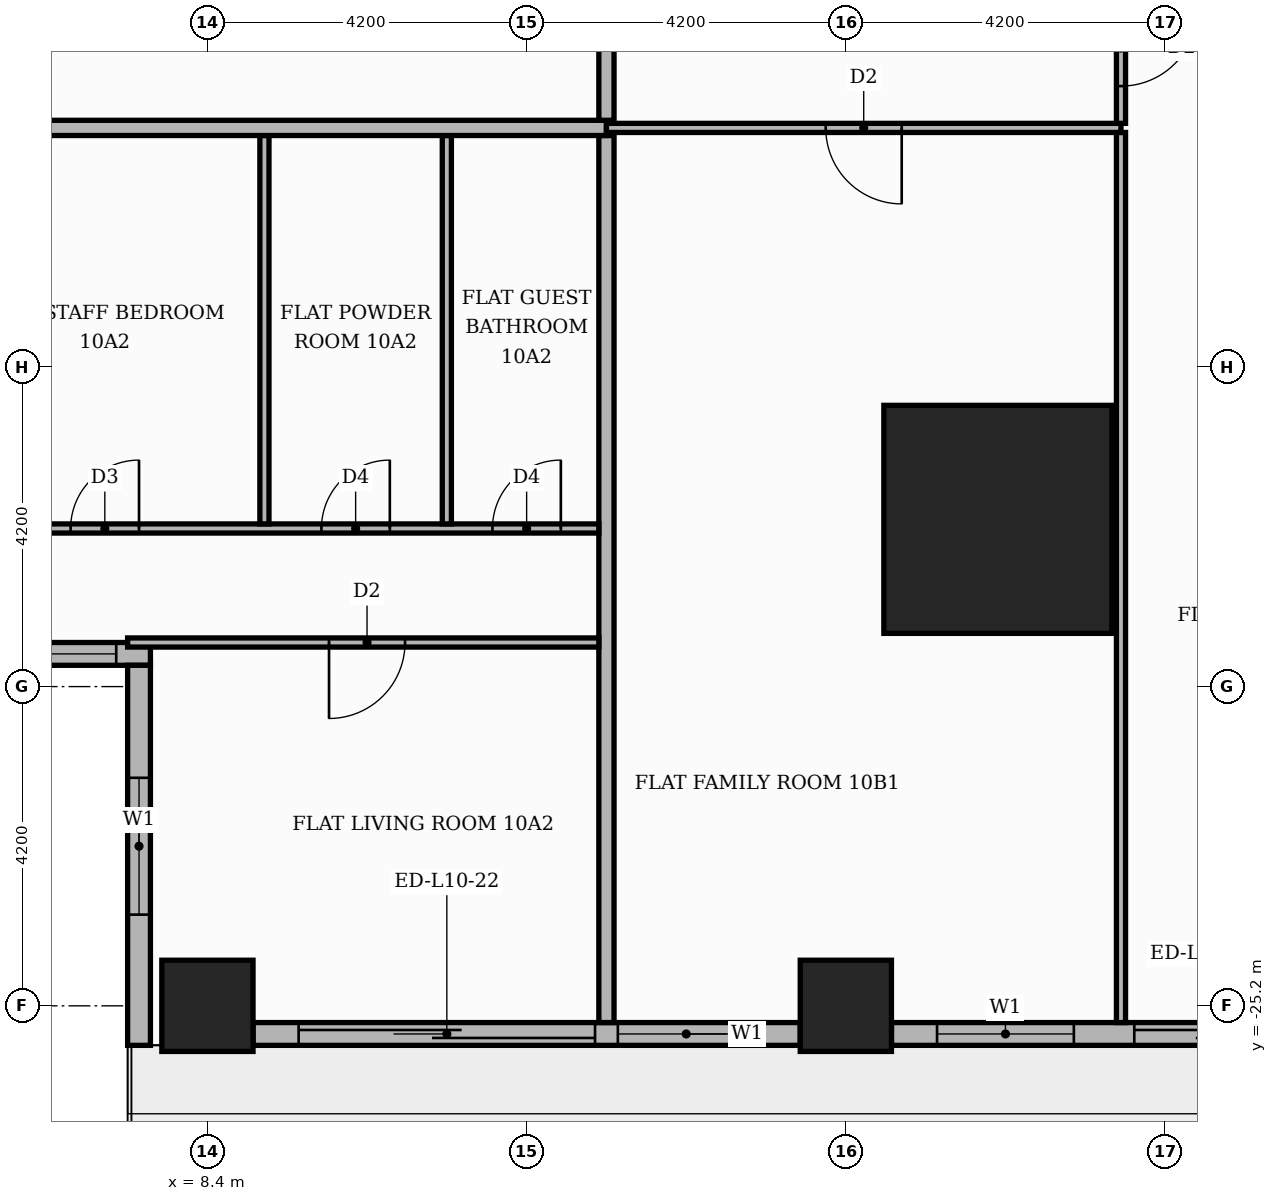
"""IFC4 building model, lengths in metres.
Left out: names, types, materials, properties, quantities, classifications, styles, units other than length and angle.
Written with IfcOpenShell. Run it as: python <this file> out.ifc"""

import sys

from ifc_helpers import new_model, si_unit, direction, frame, frame_2d, origin, origin_2d, place, context, subcontext, project, spatial, rectangle, extrude, element, fill, save


model = new_model("IFC4")
c1 = context("Model", 3, precision=1e-05, world=origin(), true_north=direction((0.0, 1.0)))
c2 = subcontext(c1, "Body", "Model", "MODEL_VIEW")
j1 = project(units=[si_unit("LENGTHUNIT", "METRE"), si_unit("PLANEANGLEUNIT", "RADIAN")], contexts=[c1])
p1 = place(None, origin())
s1 = spatial("IfcSite", under=j1, at=p1, CompositionType="ELEMENT")
p2 = place(p1, origin())
s2 = spatial("IfcBuilding", under=s1, at=p2, CompositionType="ELEMENT")
p3 = place(p2, frame((0.0, 0.0, 46.5)))
s3 = spatial("IfcBuildingStorey", under=s2, at=p3, CompositionType="ELEMENT", Elevation=46.5)
p4 = place(p3, frame((18.8, -18.8, 0.0), z_axis=(0.0, 0.0, 1.0), x_axis=(1.0, 0.0, 0.0)))
e1 = element("IfcColumn", 1, at=p4, inside=s3, PredefinedType="COLUMN", context=c2, shape_type="SweptSolid", body=[
    extrude(rectangle(XDim=3.0, YDim=3.0, at=origin_2d()), origin(), (0.0, 0.0, 1.0), 3.9),
])
for number, where, z_axis, x_axis in (
    (2, (8.4, -25.2, 0.0), (0.0, 0.0, 1.0), (1.0, 0.0, 0.0)),
    (3, (16.8, -25.2, 0.0), (0.0, 0.0, 1.0), (1.0, 0.0, 0.0)),
):
    element("IfcColumn", number, at=place(p3, frame(where, z_axis=z_axis, x_axis=x_axis)), inside=s3, PredefinedType="COLUMN", context=c2, shape_type="SweptSolid", body=[
        extrude(rectangle(XDim=1.2, YDim=1.2, at=origin_2d()), origin(), (0.0, 0.0, 1.0), 3.9),
    ])
p5 = place(p3, frame((-7.35, -20.57, 0.0), z_axis=(0.0, 0.0, 1.0), x_axis=(1.0, 0.0, 0.0)))
e4 = element("IfcWall", 4, at=p5, inside=s3, PredefinedType="STANDARD", context=c2, shape_type="SweptSolid", body=[
    extrude(rectangle(XDim=15.0, YDim=0.3, at=frame_2d((7.5, 0.0))), origin(), (0.0, 0.0, 1.0), 3.48),
])
p6 = place(p5, frame((0.15, 0.0, 0.9)))
e5 = element("IfcOpeningElement", 5, at=p6, cuts=e4, PredefinedType="OPENING", context=c2, shape_type="SweptSolid", body=[
    extrude(rectangle(XDim=1.8, YDim=2.1, at=frame_2d((0.9, 1.05))), frame((0.0, 0.16, 0.0), z_axis=(0.0, -1.0, 0.0), x_axis=(1.0, 0.0, 0.0)), (0.0, 0.0, 1.0), 0.32),
])
p7 = place(p5, frame((2.25, 0.0, 0.9)))
e6 = element("IfcOpeningElement", 6, at=p7, cuts=e4, PredefinedType="OPENING", context=c2, shape_type="SweptSolid", body=[
    extrude(rectangle(XDim=6.0, YDim=2.1, at=frame_2d((3.0, 1.05))), frame((0.0, 0.16, 0.0), z_axis=(0.0, -1.0, 0.0), x_axis=(1.0, 0.0, 0.0)), (0.0, 0.0, 1.0), 0.32),
])
p8 = place(p5, frame((8.55, 0.0, 0.9)))
e7 = element("IfcOpeningElement", 7, at=p8, cuts=e4, PredefinedType="OPENING", context=c2, shape_type="SweptSolid", body=[
    extrude(rectangle(XDim=6.0, YDim=2.1, at=frame_2d((3.0, 1.05))), frame((0.0, 0.16, 0.0), z_axis=(0.0, -1.0, 0.0), x_axis=(1.0, 0.0, 0.0)), (0.0, 0.0, 1.0), 0.32),
])
p9 = place(p3, frame((7.5, -20.72, 0.0), z_axis=(0.0, 0.0, 1.0), x_axis=(0.0, -1.0, 0.0)))
e8 = element("IfcWall", 8, at=p9, inside=s3, PredefinedType="STANDARD", context=c2, shape_type="SweptSolid", body=[
    extrude(rectangle(XDim=5.0, YDim=0.3, at=frame_2d((2.5, 0.0))), origin(), (0.0, 0.0, 1.0), 3.48),
])
p10 = place(p9, frame((1.48, 0.0, 0.9)))
e9 = element("IfcOpeningElement", 9, at=p10, cuts=e8, PredefinedType="OPENING", context=c2, shape_type="SweptSolid", body=[
    extrude(rectangle(XDim=1.8, YDim=2.1, at=frame_2d((0.9, 1.05))), frame((0.0, 0.16, 0.0), z_axis=(0.0, -1.0, 0.0), x_axis=(1.0, 0.0, 0.0)), (0.0, 0.0, 1.0), 0.32),
])
p11 = place(p3, frame((9.0, -25.57, 0.0), z_axis=(0.0, 0.0, 1.0), x_axis=(1.0, 0.0, 0.0)))
e10 = element("IfcWall", 10, at=p11, inside=s3, PredefinedType="STANDARD", context=c2, shape_type="SweptSolid", body=[
    extrude(rectangle(XDim=7.2, YDim=0.3, at=frame_2d((3.6, 0.0))), origin(), (0.0, 0.0, 1.0), 3.48),
])
p12 = place(p11, frame((0.6, 0.0, 0.0)))
e11 = element("IfcOpeningElement", 11, at=p12, cuts=e10, PredefinedType="OPENING", context=c2, shape_type="SweptSolid", body=[
    extrude(rectangle(XDim=3.9, YDim=2.4, at=frame_2d((1.95, 1.2))), frame((0.0, 0.16, 0.0), z_axis=(0.0, -1.0, 0.0), x_axis=(1.0, 0.0, 0.0)), (0.0, 0.0, 1.0), 0.32),
])
p13 = place(p11, frame((4.8, 0.0, 0.9)))
e12 = element("IfcOpeningElement", 12, at=p13, cuts=e10, PredefinedType="OPENING", context=c2, shape_type="SweptSolid", body=[
    extrude(rectangle(XDim=1.8, YDim=2.1, at=frame_2d((0.9, 1.05))), frame((0.0, 0.16, 0.0), z_axis=(0.0, -1.0, 0.0), x_axis=(1.0, 0.0, 0.0)), (0.0, 0.0, 1.0), 0.32),
])
p14 = place(p3, frame((17.4, -25.57, 0.0), z_axis=(0.0, 0.0, 1.0), x_axis=(1.0, 0.0, 0.0)))
e13 = element("IfcWall", 13, at=p14, inside=s3, PredefinedType="STANDARD", context=c2, shape_type="SweptSolid", body=[
    extrude(rectangle(XDim=5.32, YDim=0.3, at=frame_2d((2.66, 0.0))), origin(), (0.0, 0.0, 1.0), 3.48),
])
p15 = place(p14, frame((0.6, 0.0, 0.9)))
e14 = element("IfcOpeningElement", 14, at=p15, cuts=e13, PredefinedType="OPENING", context=c2, shape_type="SweptSolid", body=[
    extrude(rectangle(XDim=1.8, YDim=2.1, at=frame_2d((0.9, 1.05))), frame((0.0, 0.16, 0.0), z_axis=(0.0, -1.0, 0.0), x_axis=(1.0, 0.0, 0.0)), (0.0, 0.0, 1.0), 0.32),
])
p16 = place(p14, frame((3.195, 0.0, 0.0)))
e15 = element("IfcOpeningElement", 15, at=p16, cuts=e13, PredefinedType="OPENING", context=c2, shape_type="SweptSolid", body=[
    extrude(rectangle(XDim=1.8, YDim=2.4, at=frame_2d((0.9, 1.2))), frame((0.0, 0.16, 0.0), z_axis=(0.0, -1.0, 0.0), x_axis=(1.0, 0.0, 0.0)), (0.0, 0.0, 1.0), 0.32),
])
p17 = place(p3, frame((13.65, -25.42, 0.0), z_axis=(0.0, 0.0, 1.0), x_axis=(0.0, 1.0, 0.0)))
e16 = element("IfcWall", 16, at=p17, inside=s3, PredefinedType="PARTITIONING", context=c2, shape_type="SweptSolid", body=[
    extrude(rectangle(XDim=11.67, YDim=0.2, at=frame_2d((5.835, 0.0))), origin(), (0.0, 0.0, 1.0), 3.48),
])
p18 = place(p3, frame((20.42, -25.42, 0.0), z_axis=(0.0, 0.0, 1.0), x_axis=(0.0, 1.0, 0.0)))
e17 = element("IfcWall", 17, at=p18, inside=s3, PredefinedType="PARTITIONING", context=c2, shape_type="SweptSolid", body=[
    extrude(rectangle(XDim=11.71, YDim=0.12, at=frame_2d((5.855, 0.0))), origin(), (0.0, 0.0, 1.0), 3.48),
])
p19 = place(p3, frame((7.35, -20.42, 0.0), z_axis=(0.0, 0.0, 1.0), x_axis=(1.0, 0.0, 0.0)))
e18 = element("IfcWall", 18, at=p19, inside=s3, PredefinedType="PARTITIONING", context=c2, shape_type="SweptSolid", body=[
    extrude(rectangle(XDim=6.2, YDim=0.12, at=frame_2d((3.1, 0.0))), origin(), (0.0, 0.0, 1.0), 3.48),
])
p20 = place(p19, frame((2.65, 0.0, 0.0)))
e19 = element("IfcOpeningElement", 19, at=p20, cuts=e18, PredefinedType="OPENING", context=c2, shape_type="SweptSolid", body=[
    extrude(rectangle(XDim=1.0, YDim=2.1, at=frame_2d((0.5, 1.05))), frame((0.0, 0.07, 0.0), z_axis=(0.0, -1.0, 0.0), x_axis=(1.0, 0.0, 0.0)), (0.0, 0.0, 1.0), 0.14),
])
p21 = place(p3, frame((-1.05, -18.92, 0.0), z_axis=(0.0, 0.0, 1.0), x_axis=(1.0, 0.0, 0.0)))
e20 = element("IfcWall", 20, at=p21, inside=s3, PredefinedType="PARTITIONING", context=c2, shape_type="SweptSolid", body=[
    extrude(rectangle(XDim=14.6, YDim=0.12, at=frame_2d((7.3, 0.0))), origin(), (0.0, 0.0, 1.0), 3.48),
])
p22 = place(p21, frame((2.55, 0.0, 0.0)))
e21 = element("IfcOpeningElement", 21, at=p22, cuts=e20, PredefinedType="OPENING", context=c2, shape_type="SweptSolid", body=[
    extrude(rectangle(XDim=0.9, YDim=2.1, at=frame_2d((0.45, 1.05))), frame((0.0, 0.07, 0.0), z_axis=(0.0, -1.0, 0.0), x_axis=(1.0, 0.0, 0.0)), (0.0, 0.0, 1.0), 0.14),
])
p23 = place(p21, frame((7.65, 0.0, 0.0)))
e22 = element("IfcOpeningElement", 22, at=p23, cuts=e20, PredefinedType="OPENING", context=c2, shape_type="SweptSolid", body=[
    extrude(rectangle(XDim=0.9, YDim=2.1, at=frame_2d((0.45, 1.05))), frame((0.0, 0.07, 0.0), z_axis=(0.0, -1.0, 0.0), x_axis=(1.0, 0.0, 0.0)), (0.0, 0.0, 1.0), 0.14),
])
p24 = place(p21, frame((10.95, 0.0, 0.0)))
e23 = element("IfcOpeningElement", 23, at=p24, cuts=e20, PredefinedType="OPENING", context=c2, shape_type="SweptSolid", body=[
    extrude(rectangle(XDim=0.9, YDim=2.1, at=frame_2d((0.45, 1.05))), frame((0.0, 0.07, 0.0), z_axis=(0.0, -1.0, 0.0), x_axis=(1.0, 0.0, 0.0)), (0.0, 0.0, 1.0), 0.14),
])
p25 = place(p21, frame((13.2, 0.0, 0.0)))
e24 = element("IfcOpeningElement", 24, at=p25, cuts=e20, PredefinedType="OPENING", context=c2, shape_type="SweptSolid", body=[
    extrude(rectangle(XDim=0.9, YDim=2.1, at=frame_2d((0.45, 1.05))), frame((0.0, 0.07, 0.0), z_axis=(0.0, -1.0, 0.0), x_axis=(1.0, 0.0, 0.0)), (0.0, 0.0, 1.0), 0.14),
])
for number, where, z_axis, x_axis in (
    (25, (9.15, -18.86, 0.0), (0.0, 0.0, 1.0), (0.0, 1.0, 0.0)),
    (26, (11.55, -18.86, 0.0), (0.0, 0.0, 1.0), (0.0, 1.0, 0.0)),
):
    element("IfcWall", number, at=place(p3, frame(where, z_axis=z_axis, x_axis=x_axis)), inside=s3, PredefinedType="PARTITIONING", context=c2, shape_type="SweptSolid", body=[
        extrude(rectangle(XDim=5.11, YDim=0.12, at=frame_2d((2.555, 0.0))), origin(), (0.0, 0.0, 1.0), 3.48),
    ])
p26 = place(p3, frame((-25.42, -13.65, 0.0), z_axis=(0.0, 0.0, 1.0), x_axis=(1.0, 0.0, 0.0)))
e27 = element("IfcWall", 27, at=p26, inside=s3, PredefinedType="PARTITIONING", context=c2, shape_type="SweptSolid", body=[
    extrude(rectangle(XDim=39.07, YDim=0.2, at=frame_2d((19.535, 0.0))), origin(), (0.0, 0.0, 1.0), 3.48),
])
p27 = place(p26, frame((13.32, 0.0, 0.0)))
e28 = element("IfcOpeningElement", 28, at=p27, cuts=e27, PredefinedType="OPENING", context=c2, shape_type="SweptSolid", body=[
    extrude(rectangle(XDim=1.1, YDim=2.4, at=frame_2d((0.55, 1.2))), frame((0.0, 0.11, 0.0), z_axis=(0.0, -1.0, 0.0), x_axis=(1.0, 0.0, 0.0)), (0.0, 0.0, 1.0), 0.22),
])
p28 = place(p26, frame((21.72, 0.0, 0.0)))
e29 = element("IfcOpeningElement", 29, at=p28, cuts=e27, PredefinedType="OPENING", context=c2, shape_type="SweptSolid", body=[
    extrude(rectangle(XDim=1.1, YDim=2.4, at=frame_2d((0.55, 1.2))), frame((0.0, 0.11, 0.0), z_axis=(0.0, -1.0, 0.0), x_axis=(1.0, 0.0, 0.0)), (0.0, 0.0, 1.0), 0.22),
])
p29 = place(p3, frame((13.65, -13.65, 0.0), z_axis=(0.0, 0.0, 1.0), x_axis=(1.0, 0.0, 0.0)))
e30 = element("IfcWall", 30, at=p29, inside=s3, PredefinedType="PARTITIONING", context=c2, shape_type="SweptSolid", body=[
    extrude(rectangle(XDim=6.77, YDim=0.12, at=frame_2d((3.385, 0.0))), origin(), (0.0, 0.0, 1.0), 3.48),
])
p30 = place(p29, frame((2.885, 0.0, 0.0)))
e31 = element("IfcOpeningElement", 31, at=p30, cuts=e30, PredefinedType="OPENING", context=c2, shape_type="SweptSolid", body=[
    extrude(rectangle(XDim=1.0, YDim=2.1, at=frame_2d((0.5, 1.05))), frame((0.0, 0.07, 0.0), z_axis=(0.0, -1.0, 0.0), x_axis=(1.0, 0.0, 0.0)), (0.0, 0.0, 1.0), 0.14),
])
p31 = place(p3, frame((20.42, -13.59, 0.0), z_axis=(0.0, 0.0, 1.0), x_axis=(0.0, 1.0, 0.0)))
e32 = element("IfcWall", 32, at=p31, inside=s3, PredefinedType="PARTITIONING", context=c2, shape_type="SweptSolid", body=[
    extrude(rectangle(XDim=1.98, YDim=0.12, at=frame_2d((0.99, 0.0))), origin(), (0.0, 0.0, 1.0), 3.48),
])
p32 = place(p31, frame((0.49, 0.0, 0.0)))
e33 = element("IfcOpeningElement", 33, at=p32, cuts=e32, PredefinedType="OPENING", context=c2, shape_type="SweptSolid", body=[
    extrude(rectangle(XDim=1.0, YDim=2.1, at=frame_2d((0.5, 1.05))), frame((0.0, 0.07, 0.0), z_axis=(0.0, -1.0, 0.0), x_axis=(1.0, 0.0, 0.0)), (0.0, 0.0, 1.0), 0.14),
])
p33 = place(p3, frame((13.65, -13.55, 0.0), z_axis=(0.0, 0.0, 1.0), x_axis=(0.0, 1.0, 0.0)))
e34 = element("IfcWall", 34, at=p33, inside=s3, PredefinedType="PARTITIONING", context=c2, shape_type="SweptSolid", body=[
    extrude(rectangle(XDim=27.1, YDim=0.2, at=frame_2d((13.55, 0.0))), origin(), (0.0, 0.0, 1.0), 3.48),
])
p34 = place(p33, frame((2.5, 0.0, 0.0)))
e35 = element("IfcOpeningElement", 35, at=p34, cuts=e34, PredefinedType="OPENING", context=c2, shape_type="SweptSolid", body=[
    extrude(rectangle(XDim=1.1, YDim=2.4, at=frame_2d((0.55, 1.2))), frame((0.0, 0.11, 0.0), z_axis=(0.0, -1.0, 0.0), x_axis=(1.0, 0.0, 0.0)), (0.0, 0.0, 1.0), 0.22),
])
p35 = place(p8, origin())
e36 = element("IfcWindow", 36, at=p35, inside=s3, PartitioningType="SINGLE_PANEL", PredefinedType="WINDOW", context=c2, shape_type="SweptSolid", body=[
    extrude(rectangle(XDim=6.0, YDim=2.1, at=frame_2d((3.0, 1.05))), frame((0.0, 0.03, 0.0), z_axis=(0.0, -1.0, 0.0), x_axis=(1.0, 0.0, 0.0)), (0.0, 0.0, 1.0), 0.06),
])
fill(e7, e36)
p36 = place(p10, origin())
e37 = element("IfcWindow", 37, at=p36, inside=s3, PartitioningType="SINGLE_PANEL", PredefinedType="WINDOW", context=c2, shape_type="SweptSolid", body=[
    extrude(rectangle(XDim=1.8, YDim=2.1, at=frame_2d((0.9, 1.05))), frame((0.0, 0.03, 0.0), z_axis=(0.0, -1.0, 0.0), x_axis=(1.0, 0.0, 0.0)), (0.0, 0.0, 1.0), 0.06),
])
fill(e9, e37)
p37 = place(p12, origin())
e38 = element("IfcDoor", 38, at=p37, inside=s3, OperationType="SLIDING_TO_LEFT", PredefinedType="DOOR", context=c2, shape_type="SweptSolid", body=[
    extrude(rectangle(XDim=3.9, YDim=2.4, at=frame_2d((1.95, 1.2))), frame((0.0, 0.025, 0.0), z_axis=(0.0, -1.0, 0.0), x_axis=(1.0, 0.0, 0.0)), (0.0, 0.0, 1.0), 0.05),
])
fill(e11, e38)
p38 = place(p13, origin())
e39 = element("IfcWindow", 39, at=p38, inside=s3, PartitioningType="SINGLE_PANEL", PredefinedType="WINDOW", context=c2, shape_type="SweptSolid", body=[
    extrude(rectangle(XDim=1.8, YDim=2.1, at=frame_2d((0.9, 1.05))), frame((0.0, 0.03, 0.0), z_axis=(0.0, -1.0, 0.0), x_axis=(1.0, 0.0, 0.0)), (0.0, 0.0, 1.0), 0.06),
])
fill(e12, e39)
p39 = place(p15, origin())
e40 = element("IfcWindow", 40, at=p39, inside=s3, PartitioningType="SINGLE_PANEL", PredefinedType="WINDOW", context=c2, shape_type="SweptSolid", body=[
    extrude(rectangle(XDim=1.8, YDim=2.1, at=frame_2d((0.9, 1.05))), frame((0.0, 0.03, 0.0), z_axis=(0.0, -1.0, 0.0), x_axis=(1.0, 0.0, 0.0)), (0.0, 0.0, 1.0), 0.06),
])
fill(e14, e40)
p40 = place(p16, origin())
e41 = element("IfcDoor", 41, at=p40, inside=s3, OperationType="SLIDING_TO_RIGHT", PredefinedType="DOOR", context=c2, shape_type="SweptSolid", body=[
    extrude(rectangle(XDim=1.8, YDim=2.4, at=frame_2d((0.9, 1.2))), frame((0.0, 0.025, 0.0), z_axis=(0.0, -1.0, 0.0), x_axis=(1.0, 0.0, 0.0)), (0.0, 0.0, 1.0), 0.05),
])
fill(e15, e41)
p41 = place(p23, origin())
e42 = element("IfcDoor", 42, at=p41, inside=s3, OperationType="SINGLE_SWING_RIGHT", PredefinedType="DOOR", context=c2, shape_type="SweptSolid", body=[
    extrude(rectangle(XDim=0.9, YDim=2.1, at=frame_2d((0.45, 1.05))), frame((0.0, 0.025, 0.0), z_axis=(0.0, -1.0, 0.0), x_axis=(1.0, 0.0, 0.0)), (0.0, 0.0, 1.0), 0.05),
])
fill(e22, e42)
p42 = place(p24, origin())
e43 = element("IfcDoor", 43, at=p42, inside=s3, OperationType="SINGLE_SWING_RIGHT", PredefinedType="DOOR", context=c2, shape_type="SweptSolid", body=[
    extrude(rectangle(XDim=0.9, YDim=2.1, at=frame_2d((0.45, 1.05))), frame((0.0, 0.025, 0.0), z_axis=(0.0, -1.0, 0.0), x_axis=(1.0, 0.0, 0.0)), (0.0, 0.0, 1.0), 0.05),
])
fill(e23, e43)
p43 = place(p25, origin())
e44 = element("IfcDoor", 44, at=p43, inside=s3, OperationType="SINGLE_SWING_RIGHT", PredefinedType="DOOR", context=c2, shape_type="SweptSolid", body=[
    extrude(rectangle(XDim=0.9, YDim=2.1, at=frame_2d((0.45, 1.05))), frame((0.0, 0.025, 0.0), z_axis=(0.0, -1.0, 0.0), x_axis=(1.0, 0.0, 0.0)), (0.0, 0.0, 1.0), 0.05),
])
fill(e24, e44)
p44 = place(p20, frame((1.0, 0.0, 0.0), z_axis=(0.0, 0.0, 1.0), x_axis=(-1.0, 0.0, 0.0)))
e45 = element("IfcDoor", 45, at=p44, inside=s3, OperationType="SINGLE_SWING_LEFT", PredefinedType="DOOR", context=c2, shape_type="SweptSolid", body=[
    extrude(rectangle(XDim=1.0, YDim=2.1, at=frame_2d((0.5, 1.05))), frame((0.0, 0.025, 0.0), z_axis=(0.0, -1.0, 0.0), x_axis=(1.0, 0.0, 0.0)), (0.0, 0.0, 1.0), 0.05),
])
fill(e19, e45)
p45 = place(p30, frame((1.0, 0.0, 0.0), z_axis=(0.0, 0.0, 1.0), x_axis=(-1.0, 0.0, 0.0)))
e46 = element("IfcDoor", 46, at=p45, inside=s3, OperationType="SINGLE_SWING_RIGHT", PredefinedType="DOOR", context=c2, shape_type="SweptSolid", body=[
    extrude(rectangle(XDim=1.0, YDim=2.1, at=frame_2d((0.5, 1.05))), frame((0.0, 0.025, 0.0), z_axis=(0.0, -1.0, 0.0), x_axis=(1.0, 0.0, 0.0)), (0.0, 0.0, 1.0), 0.05),
])
fill(e31, e46)
p46 = place(p32, frame((1.0, 0.0, 0.0), z_axis=(0.0, 0.0, 1.0), x_axis=(-1.0, 0.0, 0.0)))
e47 = element("IfcDoor", 47, at=p46, inside=s3, OperationType="SINGLE_SWING_RIGHT", PredefinedType="DOOR", context=c2, shape_type="SweptSolid", body=[
    extrude(rectangle(XDim=1.0, YDim=2.1, at=frame_2d((0.5, 1.05))), frame((0.0, 0.025, 0.0), z_axis=(0.0, -1.0, 0.0), x_axis=(1.0, 0.0, 0.0)), (0.0, 0.0, 1.0), 0.05),
])
fill(e33, e47)
save(model, sys.argv[1])
